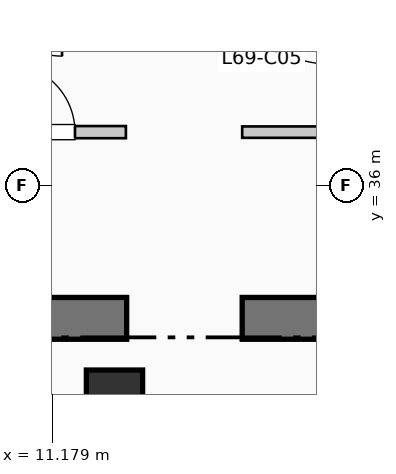
"""IFC4 building model, lengths in metres.
Left out: names, types, materials, properties, quantities, classifications, styles, units other than length and angle.
Written with IfcOpenShell. Run it as: python <this file> out.ifc"""

import sys

from ifc_helpers import new_model, si_unit, direction, frame, frame_2d, origin, origin_2d, place, context, subcontext, project, spatial, rectangle, extrude, element, fill, save


model = new_model("IFC4")
c1 = context("Model", 3, precision=1e-05, world=origin(), true_north=direction((0.0, 1.0)))
c2 = subcontext(c1, "Body", "Model", "MODEL_VIEW")
j1 = project(units=[si_unit("LENGTHUNIT", "METRE"), si_unit("PLANEANGLEUNIT", "RADIAN")], contexts=[c1])
p1 = place(None, origin())
s1 = spatial("IfcSite", under=j1, at=p1, CompositionType="ELEMENT")
p2 = place(p1, origin())
s2 = spatial("IfcBuilding", under=s1, at=p2, CompositionType="ELEMENT")
p3 = place(p2, frame((0.0, 0.0, 284.13)))
s3 = spatial("IfcBuildingStorey", under=s2, at=p3, CompositionType="ELEMENT", Elevation=284.13)
p4 = place(p3, frame((1.45, 34.25, 0.0), z_axis=(0.0, 0.0, 1.0), x_axis=(1.0, 0.0, 0.0)))
e1 = element("IfcWall", 1, at=p4, inside=s3, PredefinedType="SHEAR", context=c2, shape_type="SweptSolid", body=[
    extrude(rectangle(XDim=10.71, YDim=0.55, at=frame_2d((5.355, 0.0))), origin(), (0.0, 0.0, 1.0), 3.96),
])
p5 = place(p4, frame((7.25, 0.0, 0.0), z_axis=(0.0, 0.0, 1.0), x_axis=(-1.0, 0.0, 0.0)))
e2 = element("IfcOpeningElement", 2, at=p5, cuts=e1, PredefinedType="OPENING", context=c2, shape_type="SweptSolid", body=[
    extrude(rectangle(XDim=1.1, YDim=2.15, at=frame_2d((0.55, 1.075))), frame((0.0, 0.285, 0.0), z_axis=(0.0, -1.0, 0.0), x_axis=(1.0, 0.0, 0.0)), (0.0, 0.0, 1.0), 0.57),
])
p6 = place(p3, frame((13.68, 34.25, 0.0), z_axis=(0.0, 0.0, 1.0), x_axis=(1.0, 0.0, 0.0)))
e3 = element("IfcWall", 3, at=p6, inside=s3, PredefinedType="SHEAR", context=c2, shape_type="SweptSolid", body=[
    extrude(rectangle(XDim=6.12, YDim=0.55, at=frame_2d((3.06, 0.0))), origin(), (0.0, 0.0, 1.0), 3.96),
])
p7 = place(p3, frame((12.0, 33.2, 0.0), z_axis=(0.0, 0.0, 1.0), x_axis=(1.0, 0.0, 0.0)))
e4 = element("IfcColumn", 4, at=p7, inside=s3, PredefinedType="COLUMN", context=c2, shape_type="SweptSolid", body=[
    extrude(rectangle(XDim=0.74, YDim=0.74, at=origin_2d()), origin(), (0.0, 0.0, 1.0), 3.96),
])
p8 = place(p3, frame((8.9, 36.7, 0.0), z_axis=(0.0, 0.0, 1.0), x_axis=(1.0, 0.0, 0.0)))
e5 = element("IfcWall", 5, at=p8, inside=s3, PredefinedType="PARTITIONING", context=c2, shape_type="SweptSolid", body=[
    extrude(rectangle(XDim=3.25, YDim=0.16, at=frame_2d((1.625, 0.0))), origin(), (0.0, 0.0, 1.0), 3.74),
])
p9 = place(p8, frame((0.26, 0.0, 0.0)))
e6 = element("IfcOpeningElement", 6, at=p9, cuts=e5, PredefinedType="OPENING", context=c2, shape_type="SweptSolid", body=[
    extrude(rectangle(XDim=0.9, YDim=2.15, at=frame_2d((0.45, 1.075))), frame((0.0, 0.09, 0.0), z_axis=(0.0, -1.0, 0.0), x_axis=(1.0, 0.0, 0.0)), (0.0, 0.0, 1.0), 0.18),
])
p10 = place(p8, frame((1.68, 0.0, 0.0)))
e7 = element("IfcOpeningElement", 7, at=p10, cuts=e5, PredefinedType="OPENING", context=c2, shape_type="SweptSolid", body=[
    extrude(rectangle(XDim=0.9, YDim=2.15, at=frame_2d((0.45, 1.075))), frame((0.0, 0.09, 0.0), z_axis=(0.0, -1.0, 0.0), x_axis=(1.0, 0.0, 0.0)), (0.0, 0.0, 1.0), 0.18),
])
p11 = place(p3, frame((13.68, 36.7, 0.0), z_axis=(0.0, 0.0, 1.0), x_axis=(1.0, 0.0, 0.0)))
e8 = element("IfcWall", 8, at=p11, inside=s3, PredefinedType="PARTITIONING", context=c2, shape_type="SweptSolid", body=[
    extrude(rectangle(XDim=3.28, YDim=0.15, at=frame_2d((1.64, 0.0))), origin(), (0.0, 0.0, 1.0), 3.74),
])
p12 = place(p11, frame((1.15, 0.0, 0.0)))
e9 = element("IfcOpeningElement", 9, at=p12, cuts=e8, PredefinedType="OPENING", context=c2, shape_type="SweptSolid", body=[
    extrude(rectangle(XDim=0.95, YDim=2.15, at=frame_2d((0.475, 1.075))), frame((0.0, 0.085, 0.0), z_axis=(0.0, -1.0, 0.0), x_axis=(1.0, 0.0, 0.0)), (0.0, 0.0, 1.0), 0.17),
])
p13 = place(p10, origin())
e10 = element("IfcDoor", 10, at=p13, inside=s3, OperationType="SINGLE_SWING_LEFT", PredefinedType="DOOR", context=c2, shape_type="SweptSolid", body=[
    extrude(rectangle(XDim=0.9, YDim=2.15, at=frame_2d((0.45, 1.075))), frame((0.0, 0.025, 0.0), z_axis=(0.0, -1.0, 0.0), x_axis=(1.0, 0.0, 0.0)), (0.0, 0.0, 1.0), 0.05),
])
fill(e7, e10)
save(model, sys.argv[1])
